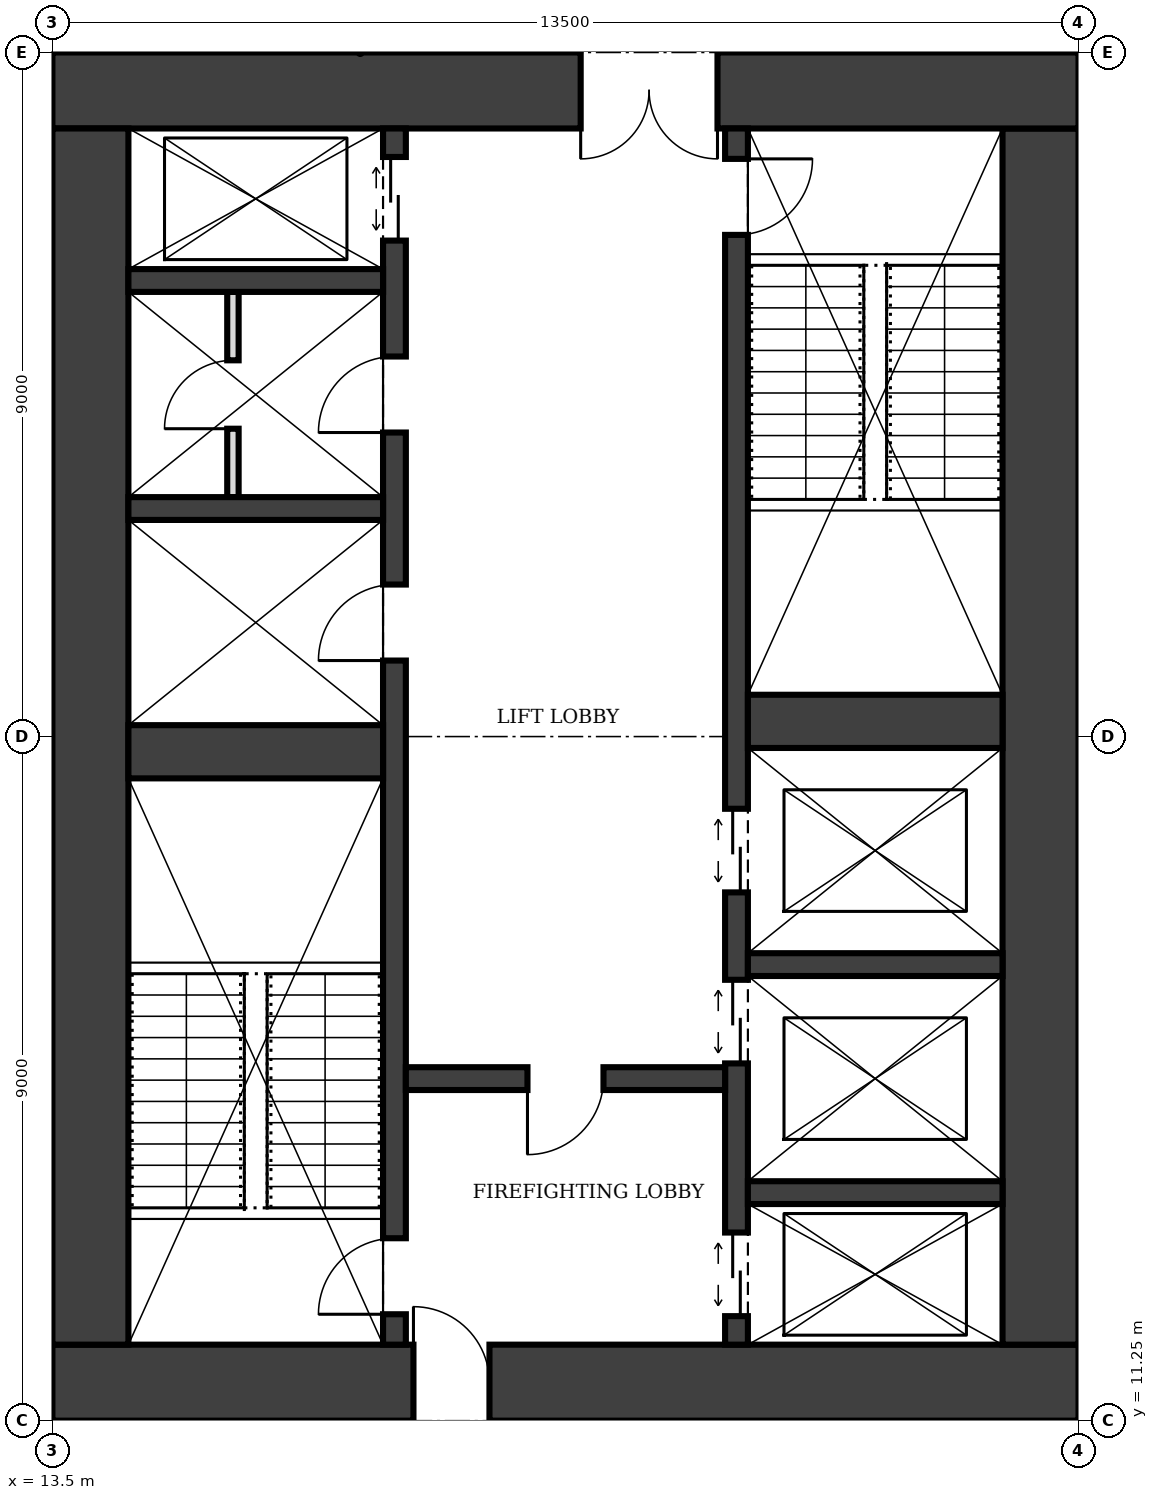
"""IFC4 building model, lengths in metres.
Left out: names, types, materials, properties, quantities, classifications, styles, units other than length and angle.
Written with IfcOpenShell. Run it as: python <this file> out.ifc"""

import sys

from ifc_helpers import new_model, si_unit, direction, frame, frame_2d, origin, place, context, subcontext, project, spatial, rectangle, extrude, element, fill, save


model = new_model("IFC4")
c1 = context("Model", 3, precision=1e-05, world=origin(), true_north=direction((0.0, 1.0)))
c2 = subcontext(c1, "Body", "Model", "MODEL_VIEW")
j1 = project(units=[si_unit("LENGTHUNIT", "METRE"), si_unit("PLANEANGLEUNIT", "RADIAN")], contexts=[c1])
p1 = place(None, origin())
s1 = spatial("IfcSite", under=j1, at=p1, CompositionType="ELEMENT")
p2 = place(p1, origin())
s2 = spatial("IfcBuilding", under=s1, at=p2, CompositionType="ELEMENT")
p3 = place(p2, frame((0.0, 0.0, 233.0)))
s3 = spatial("IfcBuildingStorey", under=s2, at=p3, CompositionType="ELEMENT", Elevation=233.0)
p4 = place(p3, frame((13.5, 11.75, 0.0), z_axis=(0.0, 0.0, 1.0), x_axis=(1.0, 0.0, 0.0)))
e1 = element("IfcWall", 1, at=p4, inside=s3, PredefinedType="SHEAR", context=c2, shape_type="SweptSolid", body=[
    extrude(rectangle(XDim=13.5, YDim=1.0, at=frame_2d((6.75, 0.0))), origin(), (0.0, 0.0, 1.0), 4.0),
])
p5 = place(p4, frame((4.75, 0.0, 0.0)))
e2 = element("IfcOpeningElement", 2, at=p5, cuts=e1, PredefinedType="OPENING", context=c2, shape_type="SweptSolid", body=[
    extrude(rectangle(XDim=1.0, YDim=2.1, at=frame_2d((0.5, 1.05))), frame((0.0, 0.51, 0.0), z_axis=(0.0, -1.0, 0.0), x_axis=(1.0, 0.0, 0.0)), (0.0, 0.0, 1.0), 1.02),
])
p6 = place(p3, frame((26.5, 12.25, 0.0), z_axis=(0.0, 0.0, 1.0), x_axis=(0.0, 1.0, 0.0)))
e3 = element("IfcWall", 3, at=p6, inside=s3, PredefinedType="SHEAR", context=c2, shape_type="SweptSolid", body=[
    extrude(rectangle(XDim=16.0, YDim=1.0, at=frame_2d((8.0, 0.0))), origin(), (0.0, 0.0, 1.0), 4.0),
])
p7 = place(p3, frame((27.0, 28.75, 0.0), z_axis=(0.0, 0.0, 1.0), x_axis=(-1.0, 0.0, 0.0)))
e4 = element("IfcWall", 4, at=p7, inside=s3, PredefinedType="SHEAR", context=c2, shape_type="SweptSolid", body=[
    extrude(rectangle(XDim=13.5, YDim=1.0, at=frame_2d((6.75, 0.0))), origin(), (0.0, 0.0, 1.0), 4.0),
])
p8 = place(p7, frame((4.75, 0.0, 0.0)))
e5 = element("IfcOpeningElement", 5, at=p8, cuts=e4, PredefinedType="OPENING", context=c2, shape_type="SweptSolid", body=[
    extrude(rectangle(XDim=1.8, YDim=2.1, at=frame_2d((0.9, 1.05))), frame((0.0, 0.51, 0.0), z_axis=(0.0, -1.0, 0.0), x_axis=(1.0, 0.0, 0.0)), (0.0, 0.0, 1.0), 1.02),
])
p9 = place(p3, frame((14.0, 28.25, 0.0), z_axis=(0.0, 0.0, 1.0), x_axis=(0.0, -1.0, 0.0)))
e6 = element("IfcWall", 6, at=p9, inside=s3, PredefinedType="SHEAR", context=c2, shape_type="SweptSolid", body=[
    extrude(rectangle(XDim=16.0, YDim=1.0, at=frame_2d((8.0, 0.0))), origin(), (0.0, 0.0, 1.0), 4.0),
])
p10 = place(p3, frame((18.0, 12.25, 0.0), z_axis=(0.0, 0.0, 1.0), x_axis=(0.0, 1.0, 0.0)))
e7 = element("IfcWall", 7, at=p10, inside=s3, PredefinedType="SHEAR", context=c2, shape_type="SweptSolid", body=[
    extrude(rectangle(XDim=16.0, YDim=0.3, at=frame_2d((8.0, 0.0))), origin(), (0.0, 0.0, 1.0), 4.0),
])
p11 = place(p10, frame((0.4, 0.0, 0.0)))
e8 = element("IfcOpeningElement", 8, at=p11, cuts=e7, PredefinedType="OPENING", context=c2, shape_type="SweptSolid", body=[
    extrude(rectangle(XDim=1.0, YDim=2.1, at=frame_2d((0.5, 1.05))), frame((0.0, 0.16, 0.0), z_axis=(0.0, -1.0, 0.0), x_axis=(1.0, 0.0, 0.0)), (0.0, 0.0, 1.0), 0.32),
])
p12 = place(p10, frame((14.525, 0.0, 0.0)))
e9 = element("IfcOpeningElement", 9, at=p12, cuts=e7, PredefinedType="OPENING", context=c2, shape_type="SweptSolid", body=[
    extrude(rectangle(XDim=1.1, YDim=2.1, at=frame_2d((0.55, 1.05))), frame((0.0, 0.16, 0.0), z_axis=(0.0, -1.0, 0.0), x_axis=(1.0, 0.0, 0.0)), (0.0, 0.0, 1.0), 0.32),
])
p13 = place(p10, frame((9.0, 0.0, 0.0)))
e10 = element("IfcOpeningElement", 10, at=p13, cuts=e7, PredefinedType="OPENING", context=c2, shape_type="SweptSolid", body=[
    extrude(rectangle(XDim=1.0, YDim=2.1, at=frame_2d((0.5, 1.05))), frame((0.0, 0.16, 0.0), z_axis=(0.0, -1.0, 0.0), x_axis=(1.0, 0.0, 0.0)), (0.0, 0.0, 1.0), 0.32),
])
p14 = place(p10, frame((12.0, 0.0, 0.0)))
e11 = element("IfcOpeningElement", 11, at=p14, cuts=e7, PredefinedType="OPENING", context=c2, shape_type="SweptSolid", body=[
    extrude(rectangle(XDim=1.0, YDim=2.1, at=frame_2d((0.5, 1.05))), frame((0.0, 0.16, 0.0), z_axis=(0.0, -1.0, 0.0), x_axis=(1.0, 0.0, 0.0)), (0.0, 0.0, 1.0), 0.32),
])
p15 = place(p3, frame((22.5, 12.25, 0.0), z_axis=(0.0, 0.0, 1.0), x_axis=(0.0, 1.0, 0.0)))
e12 = element("IfcWall", 12, at=p15, inside=s3, PredefinedType="SHEAR", context=c2, shape_type="SweptSolid", body=[
    extrude(rectangle(XDim=16.0, YDim=0.3, at=frame_2d((8.0, 0.0))), origin(), (0.0, 0.0, 1.0), 4.0),
])
p16 = place(p15, frame((14.6, 0.0, 0.0)))
e13 = element("IfcOpeningElement", 13, at=p16, cuts=e12, PredefinedType="OPENING", context=c2, shape_type="SweptSolid", body=[
    extrude(rectangle(XDim=1.0, YDim=2.1, at=frame_2d((0.5, 1.05))), frame((0.0, 0.16, 0.0), z_axis=(0.0, -1.0, 0.0), x_axis=(1.0, 0.0, 0.0)), (0.0, 0.0, 1.0), 0.32),
])
p17 = place(p15, frame((0.375, 0.0, 0.0)))
e14 = element("IfcOpeningElement", 14, at=p17, cuts=e12, PredefinedType="OPENING", context=c2, shape_type="SweptSolid", body=[
    extrude(rectangle(XDim=1.1, YDim=2.1, at=frame_2d((0.55, 1.05))), frame((0.0, 0.16, 0.0), z_axis=(0.0, -1.0, 0.0), x_axis=(1.0, 0.0, 0.0)), (0.0, 0.0, 1.0), 0.32),
])
p18 = place(p15, frame((3.7, 0.0, 0.0)))
e15 = element("IfcOpeningElement", 15, at=p18, cuts=e12, PredefinedType="OPENING", context=c2, shape_type="SweptSolid", body=[
    extrude(rectangle(XDim=1.1, YDim=2.1, at=frame_2d((0.55, 1.05))), frame((0.0, 0.16, 0.0), z_axis=(0.0, -1.0, 0.0), x_axis=(1.0, 0.0, 0.0)), (0.0, 0.0, 1.0), 0.32),
])
p19 = place(p15, frame((5.95, 0.0, 0.0)))
e16 = element("IfcOpeningElement", 16, at=p19, cuts=e12, PredefinedType="OPENING", context=c2, shape_type="SweptSolid", body=[
    extrude(rectangle(XDim=1.1, YDim=2.1, at=frame_2d((0.55, 1.05))), frame((0.0, 0.16, 0.0), z_axis=(0.0, -1.0, 0.0), x_axis=(1.0, 0.0, 0.0)), (0.0, 0.0, 1.0), 0.32),
])
p20 = place(p3, frame((14.5, 20.05, 0.0), z_axis=(0.0, 0.0, 1.0), x_axis=(1.0, 0.0, 0.0)))
e17 = element("IfcWall", 17, at=p20, inside=s3, PredefinedType="SHEAR", context=c2, shape_type="SweptSolid", body=[
    extrude(rectangle(XDim=3.35, YDim=0.7, at=frame_2d((1.675, 0.0))), origin(), (0.0, 0.0, 1.0), 4.0),
])
p21 = place(p3, frame((18.15, 15.75, 0.0), z_axis=(0.0, 0.0, 1.0), x_axis=(1.0, 0.0, 0.0)))
e18 = element("IfcWall", 18, at=p21, inside=s3, PredefinedType="SHEAR", context=c2, shape_type="SweptSolid", body=[
    extrude(rectangle(XDim=4.2, YDim=0.3, at=frame_2d((2.1, 0.0))), origin(), (0.0, 0.0, 1.0), 4.0),
])
p22 = place(p21, frame((1.6, 0.0, 0.0)))
e19 = element("IfcOpeningElement", 19, at=p22, cuts=e18, PredefinedType="OPENING", context=c2, shape_type="SweptSolid", body=[
    extrude(rectangle(XDim=1.0, YDim=2.1, at=frame_2d((0.5, 1.05))), frame((0.0, 0.16, 0.0), z_axis=(0.0, -1.0, 0.0), x_axis=(1.0, 0.0, 0.0)), (0.0, 0.0, 1.0), 0.32),
])
for number, where, z_axis, x_axis in (
    (20, (22.65, 14.25, 0.0), (0.0, 0.0, 1.0), (1.0, 0.0, 0.0)),
    (21, (22.65, 17.25, 0.0), (0.0, 0.0, 1.0), (1.0, 0.0, 0.0)),
):
    element("IfcWall", number, at=place(p3, frame(where, z_axis=z_axis, x_axis=x_axis)), inside=s3, PredefinedType="SHEAR", context=c2, shape_type="SweptSolid", body=[
        extrude(rectangle(XDim=3.35, YDim=0.3, at=frame_2d((1.675, 0.0))), origin(), (0.0, 0.0, 1.0), 4.0),
    ])
p23 = place(p3, frame((22.65, 20.45, 0.0), z_axis=(0.0, 0.0, 1.0), x_axis=(1.0, 0.0, 0.0)))
e22 = element("IfcWall", 22, at=p23, inside=s3, PredefinedType="SHEAR", context=c2, shape_type="SweptSolid", body=[
    extrude(rectangle(XDim=3.35, YDim=0.7, at=frame_2d((1.675, 0.0))), origin(), (0.0, 0.0, 1.0), 4.0),
])
for number, where, z_axis, x_axis in (
    (23, (14.5, 23.25, 0.0), (0.0, 0.0, 1.0), (1.0, 0.0, 0.0)),
    (24, (14.5, 26.25, 0.0), (0.0, 0.0, 1.0), (1.0, 0.0, 0.0)),
):
    element("IfcWall", number, at=place(p3, frame(where, z_axis=z_axis, x_axis=x_axis)), inside=s3, PredefinedType="SHEAR", context=c2, shape_type="SweptSolid", body=[
        extrude(rectangle(XDim=3.35, YDim=0.3, at=frame_2d((1.675, 0.0))), origin(), (0.0, 0.0, 1.0), 4.0),
    ])
p24 = place(p3, frame((15.875, 23.4, 0.0), z_axis=(0.0, 0.0, 1.0), x_axis=(0.0, 1.0, 0.0)))
e25 = element("IfcWall", 25, at=p24, inside=s3, PredefinedType="PARTITIONING", context=c2, shape_type="SweptSolid", body=[
    extrude(rectangle(XDim=2.7, YDim=0.15, at=frame_2d((1.35, 0.0))), origin(), (0.0, 0.0, 1.0), 3.75),
])
p25 = place(p24, frame((0.9, 0.0, 0.0)))
e26 = element("IfcOpeningElement", 26, at=p25, cuts=e25, PredefinedType="OPENING", context=c2, shape_type="SweptSolid", body=[
    extrude(rectangle(XDim=0.9, YDim=2.1, at=frame_2d((0.45, 1.05))), frame((0.0, 0.085, 0.0), z_axis=(0.0, -1.0, 0.0), x_axis=(1.0, 0.0, 0.0)), (0.0, 0.0, 1.0), 0.17),
])
p26 = place(p5, origin())
e27 = element("IfcDoor", 27, at=p26, inside=s3, OperationType="SINGLE_SWING_LEFT", PredefinedType="DOOR", context=c2, shape_type="SweptSolid", body=[
    extrude(rectangle(XDim=1.0, YDim=2.1, at=frame_2d((0.5, 1.05))), frame((0.0, 0.025, 0.0), z_axis=(0.0, -1.0, 0.0), x_axis=(1.0, 0.0, 0.0)), (0.0, 0.0, 1.0), 0.05),
])
fill(e2, e27)
p27 = place(p8, origin())
e28 = element("IfcDoor", 28, at=p27, inside=s3, OperationType="DOUBLE_DOOR_SINGLE_SWING", PredefinedType="DOOR", context=c2, shape_type="SweptSolid", body=[
    extrude(rectangle(XDim=1.8, YDim=2.1, at=frame_2d((0.9, 1.05))), frame((0.0, 0.025, 0.0), z_axis=(0.0, -1.0, 0.0), x_axis=(1.0, 0.0, 0.0)), (0.0, 0.0, 1.0), 0.05),
])
fill(e5, e28)
p28 = place(p22, frame((1.0, 0.0, 0.0), z_axis=(0.0, 0.0, 1.0), x_axis=(-1.0, 0.0, 0.0)))
e29 = element("IfcDoor", 29, at=p28, inside=s3, OperationType="SINGLE_SWING_RIGHT", PredefinedType="DOOR", context=c2, shape_type="SweptSolid", body=[
    extrude(rectangle(XDim=1.0, YDim=2.1, at=frame_2d((0.5, 1.05))), frame((0.0, 0.025, 0.0), z_axis=(0.0, -1.0, 0.0), x_axis=(1.0, 0.0, 0.0)), (0.0, 0.0, 1.0), 0.05),
])
fill(e19, e29)
p29 = place(p11, origin())
e30 = element("IfcDoor", 30, at=p29, inside=s3, OperationType="SINGLE_SWING_LEFT", PredefinedType="DOOR", context=c2, shape_type="SweptSolid", body=[
    extrude(rectangle(XDim=1.0, YDim=2.1, at=frame_2d((0.5, 1.05))), frame((0.0, 0.025, 0.0), z_axis=(0.0, -1.0, 0.0), x_axis=(1.0, 0.0, 0.0)), (0.0, 0.0, 1.0), 0.05),
])
fill(e8, e30)
p30 = place(p16, frame((1.0, 0.0, 0.0), z_axis=(0.0, 0.0, 1.0), x_axis=(-1.0, 0.0, 0.0)))
e31 = element("IfcDoor", 31, at=p30, inside=s3, OperationType="SINGLE_SWING_LEFT", PredefinedType="DOOR", context=c2, shape_type="SweptSolid", body=[
    extrude(rectangle(XDim=1.0, YDim=2.1, at=frame_2d((0.5, 1.05))), frame((0.0, 0.025, 0.0), z_axis=(0.0, -1.0, 0.0), x_axis=(1.0, 0.0, 0.0)), (0.0, 0.0, 1.0), 0.05),
])
fill(e13, e31)
p31 = place(p17, origin())
e32 = element("IfcDoor", 32, at=p31, inside=s3, OperationType="DOUBLE_DOOR_SLIDING", PredefinedType="DOOR", context=c2, shape_type="SweptSolid", body=[
    extrude(rectangle(XDim=1.1, YDim=2.1, at=frame_2d((0.55, 1.05))), frame((0.0, 0.025, 0.0), z_axis=(0.0, -1.0, 0.0), x_axis=(1.0, 0.0, 0.0)), (0.0, 0.0, 1.0), 0.05),
])
fill(e14, e32)
p32 = place(p12, origin())
e33 = element("IfcDoor", 33, at=p32, inside=s3, OperationType="DOUBLE_DOOR_SLIDING", PredefinedType="DOOR", context=c2, shape_type="SweptSolid", body=[
    extrude(rectangle(XDim=1.1, YDim=2.1, at=frame_2d((0.55, 1.05))), frame((0.0, 0.025, 0.0), z_axis=(0.0, -1.0, 0.0), x_axis=(1.0, 0.0, 0.0)), (0.0, 0.0, 1.0), 0.05),
])
fill(e9, e33)
p33 = place(p18, origin())
e34 = element("IfcDoor", 34, at=p33, inside=s3, OperationType="DOUBLE_DOOR_SLIDING", PredefinedType="DOOR", context=c2, shape_type="SweptSolid", body=[
    extrude(rectangle(XDim=1.1, YDim=2.1, at=frame_2d((0.55, 1.05))), frame((0.0, 0.025, 0.0), z_axis=(0.0, -1.0, 0.0), x_axis=(1.0, 0.0, 0.0)), (0.0, 0.0, 1.0), 0.05),
])
fill(e15, e34)
p34 = place(p19, origin())
e35 = element("IfcDoor", 35, at=p34, inside=s3, OperationType="DOUBLE_DOOR_SLIDING", PredefinedType="DOOR", context=c2, shape_type="SweptSolid", body=[
    extrude(rectangle(XDim=1.1, YDim=2.1, at=frame_2d((0.55, 1.05))), frame((0.0, 0.025, 0.0), z_axis=(0.0, -1.0, 0.0), x_axis=(1.0, 0.0, 0.0)), (0.0, 0.0, 1.0), 0.05),
])
fill(e16, e35)
p35 = place(p13, origin())
e36 = element("IfcDoor", 36, at=p35, inside=s3, OperationType="SINGLE_SWING_LEFT", PredefinedType="DOOR", context=c2, shape_type="SweptSolid", body=[
    extrude(rectangle(XDim=1.0, YDim=2.1, at=frame_2d((0.5, 1.05))), frame((0.0, 0.025, 0.0), z_axis=(0.0, -1.0, 0.0), x_axis=(1.0, 0.0, 0.0)), (0.0, 0.0, 1.0), 0.05),
])
fill(e10, e36)
p36 = place(p14, origin())
e37 = element("IfcDoor", 37, at=p36, inside=s3, OperationType="SINGLE_SWING_LEFT", PredefinedType="DOOR", context=c2, shape_type="SweptSolid", body=[
    extrude(rectangle(XDim=1.0, YDim=2.1, at=frame_2d((0.5, 1.05))), frame((0.0, 0.025, 0.0), z_axis=(0.0, -1.0, 0.0), x_axis=(1.0, 0.0, 0.0)), (0.0, 0.0, 1.0), 0.05),
])
fill(e11, e37)
p37 = place(p25, origin())
e38 = element("IfcDoor", 38, at=p37, inside=s3, OperationType="SINGLE_SWING_LEFT", PredefinedType="DOOR", context=c2, shape_type="SweptSolid", body=[
    extrude(rectangle(XDim=0.9, YDim=2.1, at=frame_2d((0.45, 1.05))), frame((0.0, 0.025, 0.0), z_axis=(0.0, -1.0, 0.0), x_axis=(1.0, 0.0, 0.0)), (0.0, 0.0, 1.0), 0.05),
])
fill(e26, e38)
save(model, sys.argv[1])
